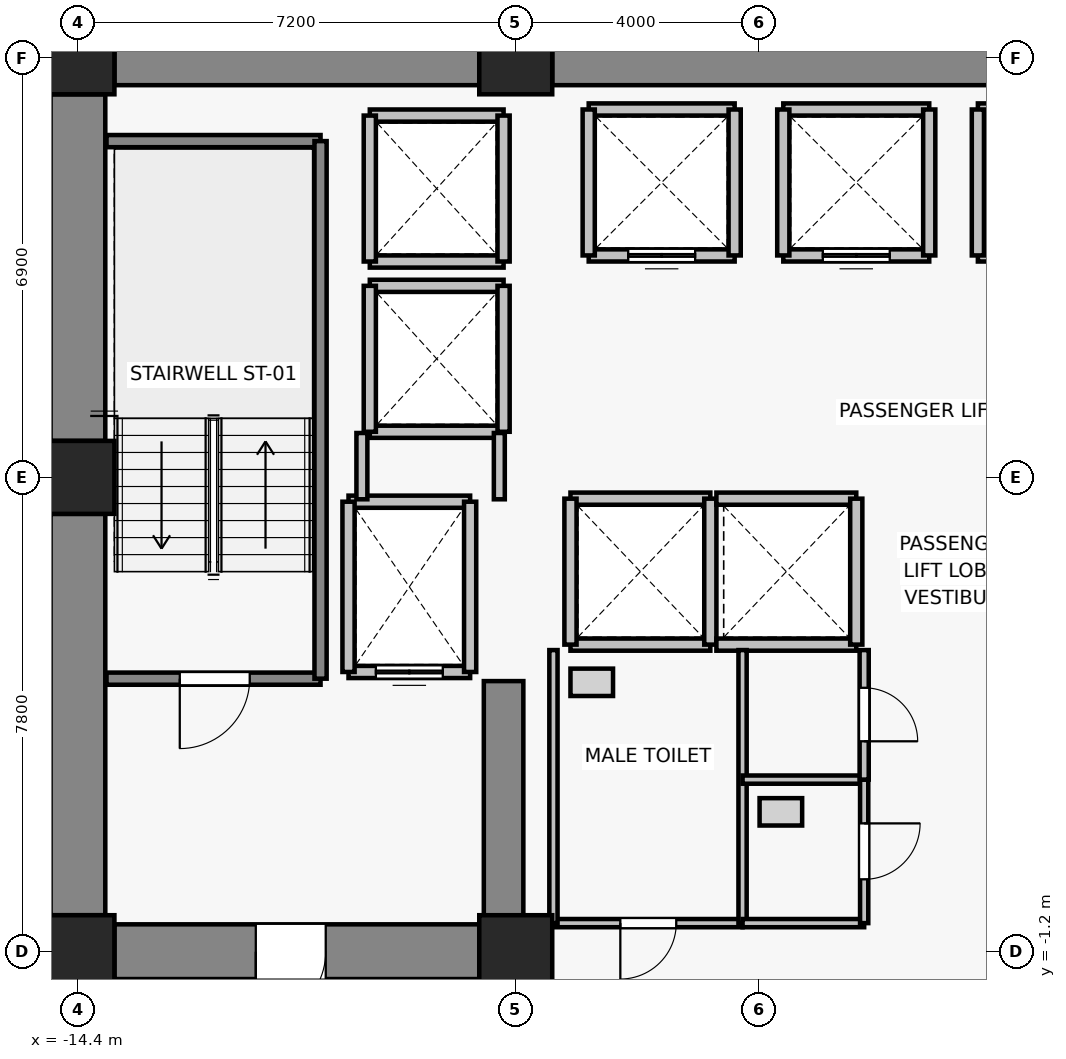
"""IFC4 building model, lengths in metres.
Left out: names, types, materials, properties, quantities, classifications, styles, units other than length and angle.
Written with IfcOpenShell. Run it as: python <this file> out.ifc"""

import sys

from ifc_helpers import new_model, si_unit, direction, frame, frame_2d, origin, origin_2d, place, context, subcontext, project, spatial, rectangle, extrude, source, transform, mapped, element, fill, save


model = new_model("IFC4")
c1 = context("Model", 3, precision=1e-05, world=origin(), true_north=direction((0.0, 1.0)))
c2 = subcontext(c1, "Body", "Model", "MODEL_VIEW")
j1 = project(units=[si_unit("LENGTHUNIT", "METRE"), si_unit("PLANEANGLEUNIT", "RADIAN")], contexts=[c1])
p1 = place(None, origin())
s1 = spatial("IfcSite", under=j1, at=p1, CompositionType="ELEMENT")
p2 = place(p1, origin())
s2 = spatial("IfcBuilding", under=s1, at=p2, CompositionType="ELEMENT")
p3 = place(p2, frame((0.0, 0.0, 30.7)))
s3 = spatial("IfcBuildingStorey", under=s2, at=p3, CompositionType="ELEMENT", Elevation=30.7)
for number, where, z_axis, x_axis in (
    (1, (-14.4, -1.2, 0.0), (0.0, 0.0, 1.0), (1.0, 0.0, 0.0)),
    (2, (-7.2, -1.2, 0.0), (0.0, 0.0, 1.0), (1.0, 0.0, 0.0)),
    (3, (-14.4, 6.6, 0.0), (0.0, 0.0, 1.0), (1.0, 0.0, 0.0)),
    (4, (-14.4, 13.5, 0.0), (0.0, 0.0, 1.0), (1.0, 0.0, 0.0)),
    (5, (-7.2, 13.5, 0.0), (0.0, 0.0, 1.0), (1.0, 0.0, 0.0)),
):
    element("IfcColumn", number, at=place(p3, frame(where, z_axis=z_axis, x_axis=x_axis)), inside=s3, PredefinedType="COLUMN", context=c2, shape_type="SweptSolid", body=[
        extrude(rectangle(XDim=1.2, YDim=1.2, at=origin_2d()), origin(), (0.0, 0.0, 1.0), 3.3),
    ])
p4 = place(p3, frame((-13.8, 13.5, 0.0), z_axis=(0.0, 0.0, 1.0), x_axis=(1.0, 0.0, 0.0)))
e6 = element("IfcWall", 6, at=p4, inside=s3, PredefinedType="SHEAR", context=c2, shape_type="SweptSolid", body=[
    extrude(rectangle(XDim=6.0, YDim=0.9, at=frame_2d((3.0, 0.0))), origin(), (0.0, 0.0, 1.0), 3.075),
])
p5 = place(p3, frame((-6.6, 13.5, 0.0), z_axis=(0.0, 0.0, 1.0), x_axis=(1.0, 0.0, 0.0)))
e7 = element("IfcWall", 7, at=p5, inside=s3, PredefinedType="SHEAR", context=c2, shape_type="SweptSolid", body=[
    extrude(rectangle(XDim=13.2, YDim=0.9, at=frame_2d((6.6, 0.0))), origin(), (0.0, 0.0, 1.0), 3.075),
])
p6 = place(p3, frame((-14.4, -0.6, 0.0), z_axis=(0.0, 0.0, 1.0), x_axis=(0.0, 1.0, 0.0)))
e8 = element("IfcWall", 8, at=p6, inside=s3, PredefinedType="SHEAR", context=c2, shape_type="SweptSolid", body=[
    extrude(rectangle(XDim=6.6, YDim=0.9, at=frame_2d((3.3, 0.0))), origin(), (0.0, 0.0, 1.0), 3.075),
])
p7 = place(p3, frame((-14.4, 7.2, 0.0), z_axis=(0.0, 0.0, 1.0), x_axis=(0.0, 1.0, 0.0)))
e9 = element("IfcWall", 9, at=p7, inside=s3, PredefinedType="SHEAR", context=c2, shape_type="SweptSolid", body=[
    extrude(rectangle(XDim=5.7, YDim=0.9, at=frame_2d((2.85, 0.0))), origin(), (0.0, 0.0, 1.0), 3.075),
])
p8 = place(p3, frame((-7.8, -1.2, 0.0), z_axis=(0.0, 0.0, 1.0), x_axis=(-1.0, 0.0, 0.0)))
e10 = element("IfcWall", 10, at=p8, inside=s3, PredefinedType="SHEAR", context=c2, shape_type="SweptSolid", body=[
    extrude(rectangle(XDim=6.0, YDim=0.9, at=frame_2d((3.0, 0.0))), origin(), (0.0, 0.0, 1.0), 3.075),
])
p9 = place(p8, frame((2.525, 0.0, 0.0)))
e11 = element("IfcOpeningElement", 11, at=p9, cuts=e10, PredefinedType="OPENING", context=c2, shape_type="SweptSolid", body=[
    extrude(rectangle(XDim=1.15, YDim=2.15, at=frame_2d((0.575, 1.075))), frame((0.0, 0.46, 0.0), z_axis=(0.0, -1.0, 0.0), x_axis=(1.0, 0.0, 0.0)), (0.0, 0.0, 1.0), 0.92),
])
p10 = place(p3, frame((-7.4, -0.75, 0.0), z_axis=(0.0, 0.0, 1.0), x_axis=(0.0, 1.0, 0.0)))
e12 = element("IfcWall", 12, at=p10, inside=s3, PredefinedType="SHEAR", context=c2, shape_type="SweptSolid", body=[
    extrude(rectangle(XDim=4.0, YDim=0.65, at=frame_2d((2.0, 0.0))), origin(), (0.0, 0.0, 1.0), 3.075),
])
p11 = place(p3, frame((-7.95, 3.4, 0.0), z_axis=(0.0, 0.0, 1.0), x_axis=(-1.0, 0.0, 0.0)))
e13 = element("IfcWall", 13, at=p11, inside=s3, PredefinedType="SOLIDWALL", context=c2, shape_type="SweptSolid", body=[
    extrude(rectangle(XDim=2.0, YDim=0.2, at=frame_2d((1.0, 0.0))), origin(), (0.0, 0.0, 1.0), 3.075),
])
p12 = place(p11, frame((0.45, 0.0, 0.0)))
e14 = element("IfcOpeningElement", 14, at=p12, cuts=e13, PredefinedType="OPENING", context=c2, shape_type="SweptSolid", body=[
    extrude(rectangle(XDim=1.1, YDim=2.2, at=frame_2d((0.55, 1.1))), frame((0.0, 0.11, 0.0), z_axis=(0.0, -1.0, 0.0), x_axis=(1.0, 0.0, 0.0)), (0.0, 0.0, 1.0), 0.22),
])
p13 = place(p3, frame((-9.95, 6.2, 0.0), z_axis=(0.0, 0.0, 1.0), x_axis=(1.0, 0.0, 0.0)))
e15 = element("IfcWall", 15, at=p13, inside=s3, PredefinedType="SOLIDWALL", context=c2, shape_type="SweptSolid", body=[
    extrude(rectangle(XDim=2.0, YDim=0.2, at=frame_2d((1.0, 0.0))), origin(), (0.0, 0.0, 1.0), 3.075),
])
for number, where, z_axis, x_axis in (
    (16, (-9.95, 3.4, 0.0), (0.0, 0.0, 1.0), (0.0, 1.0, 0.0)),
    (17, (-7.95, 6.2, 0.0), (0.0, 0.0, 1.0), (0.0, -1.0, 0.0)),
):
    element("IfcWall", number, at=place(p3, frame(where, z_axis=z_axis, x_axis=x_axis)), inside=s3, PredefinedType="SOLIDWALL", context=c2, shape_type="SweptSolid", body=[
        extrude(rectangle(XDim=2.8, YDim=0.2, at=frame_2d((1.4, 0.0))), origin(), (0.0, 0.0, 1.0), 3.075),
    ])
p14 = place(p3, frame((-3.6, 10.25, 0.0), z_axis=(0.0, 0.0, 1.0), x_axis=(-1.0, 0.0, 0.0)))
e18 = element("IfcWall", 18, at=p14, inside=s3, PredefinedType="SOLIDWALL", context=c2, shape_type="SweptSolid", body=[
    extrude(rectangle(XDim=2.4, YDim=0.2, at=frame_2d((1.2, 0.0))), origin(), (0.0, 0.0, 1.0), 3.075),
])
p15 = place(p14, frame((0.65, 0.0, 0.0)))
e19 = element("IfcOpeningElement", 19, at=p15, cuts=e18, PredefinedType="OPENING", context=c2, shape_type="SweptSolid", body=[
    extrude(rectangle(XDim=1.1, YDim=2.2, at=frame_2d((0.55, 1.1))), frame((0.0, 0.11, 0.0), z_axis=(0.0, -1.0, 0.0), x_axis=(1.0, 0.0, 0.0)), (0.0, 0.0, 1.0), 0.22),
])
for number, where, z_axis, x_axis in (
    (20, (-6.0, 12.65, 0.0), (0.0, 0.0, 1.0), (1.0, 0.0, 0.0)),
    (21, (-6.0, 10.25, 0.0), (0.0, 0.0, 1.0), (0.0, 1.0, 0.0)),
    (22, (-3.6, 12.65, 0.0), (0.0, 0.0, 1.0), (0.0, -1.0, 0.0)),
):
    element("IfcWall", number, at=place(p3, frame(where, z_axis=z_axis, x_axis=x_axis)), inside=s3, PredefinedType="SOLIDWALL", context=c2, shape_type="SweptSolid", body=[
        extrude(rectangle(XDim=2.4, YDim=0.2, at=frame_2d((1.2, 0.0))), origin(), (0.0, 0.0, 1.0), 3.075),
    ])
p16 = place(p3, frame((-0.4, 10.25, 0.0), z_axis=(0.0, 0.0, 1.0), x_axis=(-1.0, 0.0, 0.0)))
e23 = element("IfcWall", 23, at=p16, inside=s3, PredefinedType="SOLIDWALL", context=c2, shape_type="SweptSolid", body=[
    extrude(rectangle(XDim=2.4, YDim=0.2, at=frame_2d((1.2, 0.0))), origin(), (0.0, 0.0, 1.0), 3.075),
])
p17 = place(p16, frame((0.65, 0.0, 0.0)))
e24 = element("IfcOpeningElement", 24, at=p17, cuts=e23, PredefinedType="OPENING", context=c2, shape_type="SweptSolid", body=[
    extrude(rectangle(XDim=1.1, YDim=2.2, at=frame_2d((0.55, 1.1))), frame((0.0, 0.11, 0.0), z_axis=(0.0, -1.0, 0.0), x_axis=(1.0, 0.0, 0.0)), (0.0, 0.0, 1.0), 0.22),
])
p18 = place(p3, frame((-2.8, 12.65, 0.0), z_axis=(0.0, 0.0, 1.0), x_axis=(1.0, 0.0, 0.0)))
e25 = element("IfcWall", 25, at=p18, inside=s3, PredefinedType="SOLIDWALL", context=c2, shape_type="SweptSolid", body=[
    extrude(rectangle(XDim=2.4, YDim=0.2, at=frame_2d((1.2, 0.0))), origin(), (0.0, 0.0, 1.0), 3.075),
])
for number, where, z_axis, x_axis in (
    (26, (-2.8, 10.25, 0.0), (0.0, 0.0, 1.0), (0.0, 1.0, 0.0)),
    (27, (-0.4, 12.65, 0.0), (0.0, 0.0, 1.0), (0.0, -1.0, 0.0)),
):
    element("IfcWall", number, at=place(p3, frame(where, z_axis=z_axis, x_axis=x_axis)), inside=s3, PredefinedType="SOLIDWALL", context=c2, shape_type="SweptSolid", body=[
        extrude(rectangle(XDim=2.4, YDim=0.2, at=frame_2d((1.2, 0.0))), origin(), (0.0, 0.0, 1.0), 3.075),
    ])
p19 = place(p3, frame((2.8, 10.25, 0.0), z_axis=(0.0, 0.0, 1.0), x_axis=(-1.0, 0.0, 0.0)))
e28 = element("IfcWall", 28, at=p19, inside=s3, PredefinedType="SOLIDWALL", context=c2, shape_type="SweptSolid", body=[
    extrude(rectangle(XDim=2.4, YDim=0.2, at=frame_2d((1.2, 0.0))), origin(), (0.0, 0.0, 1.0), 3.075),
])
p20 = place(p19, frame((0.65, 0.0, 0.0)))
e29 = element("IfcOpeningElement", 29, at=p20, cuts=e28, PredefinedType="OPENING", context=c2, shape_type="SweptSolid", body=[
    extrude(rectangle(XDim=1.1, YDim=2.2, at=frame_2d((0.55, 1.1))), frame((0.0, 0.11, 0.0), z_axis=(0.0, -1.0, 0.0), x_axis=(1.0, 0.0, 0.0)), (0.0, 0.0, 1.0), 0.22),
])
p21 = place(p3, frame((0.4, 12.65, 0.0), z_axis=(0.0, 0.0, 1.0), x_axis=(1.0, 0.0, 0.0)))
e30 = element("IfcWall", 30, at=p21, inside=s3, PredefinedType="SOLIDWALL", context=c2, shape_type="SweptSolid", body=[
    extrude(rectangle(XDim=2.4, YDim=0.2, at=frame_2d((1.2, 0.0))), origin(), (0.0, 0.0, 1.0), 3.075),
])
p22 = place(p3, frame((0.4, 10.25, 0.0), z_axis=(0.0, 0.0, 1.0), x_axis=(0.0, 1.0, 0.0)))
e31 = element("IfcWall", 31, at=p22, inside=s3, PredefinedType="SOLIDWALL", context=c2, shape_type="SweptSolid", body=[
    extrude(rectangle(XDim=2.4, YDim=0.2, at=frame_2d((1.2, 0.0))), origin(), (0.0, 0.0, 1.0), 3.075),
])
for number, where, z_axis, x_axis in (
    (32, (-4.0, 3.85, 0.0), (0.0, 0.0, 1.0), (-1.0, 0.0, 0.0)),
    (33, (-6.3, 6.25, 0.0), (0.0, 0.0, 1.0), (1.0, 0.0, 0.0)),
):
    element("IfcWall", number, at=place(p3, frame(where, z_axis=z_axis, x_axis=x_axis)), inside=s3, PredefinedType="SOLIDWALL", context=c2, shape_type="SweptSolid", body=[
        extrude(rectangle(XDim=2.3, YDim=0.2, at=frame_2d((1.15, 0.0))), origin(), (0.0, 0.0, 1.0), 3.075),
    ])
for number, where, z_axis, x_axis in (
    (34, (-6.3, 3.85, 0.0), (0.0, 0.0, 1.0), (0.0, 1.0, 0.0)),
    (35, (-4.0, 6.25, 0.0), (0.0, 0.0, 1.0), (0.0, -1.0, 0.0)),
):
    element("IfcWall", number, at=place(p3, frame(where, z_axis=z_axis, x_axis=x_axis)), inside=s3, PredefinedType="SOLIDWALL", context=c2, shape_type="SweptSolid", body=[
        extrude(rectangle(XDim=2.4, YDim=0.2, at=frame_2d((1.2, 0.0))), origin(), (0.0, 0.0, 1.0), 3.075),
    ])
for number, where, z_axis, x_axis in (
    (36, (-1.6, 3.85, 0.0), (0.0, 0.0, 1.0), (-1.0, 0.0, 0.0)),
    (37, (-3.9, 6.25, 0.0), (0.0, 0.0, 1.0), (1.0, 0.0, 0.0)),
):
    element("IfcWall", number, at=place(p3, frame(where, z_axis=z_axis, x_axis=x_axis)), inside=s3, PredefinedType="SOLIDWALL", context=c2, shape_type="SweptSolid", body=[
        extrude(rectangle(XDim=2.3, YDim=0.2, at=frame_2d((1.15, 0.0))), origin(), (0.0, 0.0, 1.0), 3.075),
    ])
p23 = place(p3, frame((-1.6, 6.25, 0.0), z_axis=(0.0, 0.0, 1.0), x_axis=(0.0, -1.0, 0.0)))
e38 = element("IfcWall", 38, at=p23, inside=s3, PredefinedType="SOLIDWALL", context=c2, shape_type="SweptSolid", body=[
    extrude(rectangle(XDim=2.4, YDim=0.2, at=frame_2d((1.2, 0.0))), origin(), (0.0, 0.0, 1.0), 3.075),
])
for number, where, z_axis, x_axis in (
    (39, (-7.4, 7.35, 0.0), (0.0, 0.0, 1.0), (-1.0, 0.0, 0.0)),
    (40, (-9.6, 9.75, 0.0), (0.0, 0.0, 1.0), (1.0, 0.0, 0.0)),
):
    element("IfcWall", number, at=place(p3, frame(where, z_axis=z_axis, x_axis=x_axis)), inside=s3, PredefinedType="SOLIDWALL", context=c2, shape_type="SweptSolid", body=[
        extrude(rectangle(XDim=2.2, YDim=0.2, at=frame_2d((1.1, 0.0))), origin(), (0.0, 0.0, 1.0), 2.465),
    ])
p24 = place(p3, frame((-9.6, 7.35, 0.0), z_axis=(0.0, 0.0, 1.0), x_axis=(0.0, 1.0, 0.0)))
e41 = element("IfcWall", 41, at=p24, inside=s3, PredefinedType="SOLIDWALL", context=c2, shape_type="SweptSolid", body=[
    extrude(rectangle(XDim=2.4, YDim=0.2, at=frame_2d((1.2, 0.0))), origin(), (0.0, 0.0, 1.0), 3.075),
])
p25 = place(p3, frame((-7.4, 9.75, 0.0), z_axis=(0.0, 0.0, 1.0), x_axis=(0.0, -1.0, 0.0)))
e42 = element("IfcWall", 42, at=p25, inside=s3, PredefinedType="SOLIDWALL", context=c2, shape_type="SweptSolid", body=[
    extrude(rectangle(XDim=2.4, YDim=0.2, at=frame_2d((1.2, 0.0))), origin(), (0.0, 0.0, 1.0), 2.465),
])
for number, where, z_axis, x_axis in (
    (43, (-7.4, 10.15, 0.0), (0.0, 0.0, 1.0), (-1.0, 0.0, 0.0)),
    (44, (-9.6, 12.55, 0.0), (0.0, 0.0, 1.0), (1.0, 0.0, 0.0)),
):
    element("IfcWall", number, at=place(p3, frame(where, z_axis=z_axis, x_axis=x_axis)), inside=s3, PredefinedType="SOLIDWALL", context=c2, shape_type="SweptSolid", body=[
        extrude(rectangle(XDim=2.2, YDim=0.2, at=frame_2d((1.1, 0.0))), origin(), (0.0, 0.0, 1.0), 2.465),
    ])
p26 = place(p3, frame((-9.6, 10.15, 0.0), z_axis=(0.0, 0.0, 1.0), x_axis=(0.0, 1.0, 0.0)))
e45 = element("IfcWall", 45, at=p26, inside=s3, PredefinedType="SOLIDWALL", context=c2, shape_type="SweptSolid", body=[
    extrude(rectangle(XDim=2.4, YDim=0.2, at=frame_2d((1.2, 0.0))), origin(), (0.0, 0.0, 1.0), 3.075),
])
p27 = place(p3, frame((-7.4, 12.55, 0.0), z_axis=(0.0, 0.0, 1.0), x_axis=(0.0, -1.0, 0.0)))
e46 = element("IfcWall", 46, at=p27, inside=s3, PredefinedType="SOLIDWALL", context=c2, shape_type="SweptSolid", body=[
    extrude(rectangle(XDim=2.4, YDim=0.2, at=frame_2d((1.2, 0.0))), origin(), (0.0, 0.0, 1.0), 2.465),
])
p28 = place(p3, frame((-10.41, 3.29, 0.0), z_axis=(0.0, 0.0, 1.0), x_axis=(-1.0, 0.0, 0.0)))
e47 = element("IfcWall", 47, at=p28, inside=s3, PredefinedType="SOLIDWALL", context=c2, shape_type="SweptSolid", body=[
    extrude(rectangle(XDim=3.52, YDim=0.2, at=frame_2d((1.76, 0.0))), origin(), (0.0, 0.0, 1.0), 3.075),
])
p29 = place(p28, frame((1.165, 0.0, 0.0)))
e48 = element("IfcOpeningElement", 48, at=p29, cuts=e47, PredefinedType="OPENING", context=c2, shape_type="SweptSolid", body=[
    extrude(rectangle(XDim=1.15, YDim=2.15, at=frame_2d((0.575, 1.075))), frame((0.0, 0.11, 0.0), z_axis=(0.0, -1.0, 0.0), x_axis=(1.0, 0.0, 0.0)), (0.0, 0.0, 1.0), 0.22),
])
p30 = place(p3, frame((-13.93, 12.13, 0.0), z_axis=(0.0, 0.0, 1.0), x_axis=(1.0, 0.0, 0.0)))
e49 = element("IfcWall", 49, at=p30, inside=s3, PredefinedType="SOLIDWALL", context=c2, shape_type="SweptSolid", body=[
    extrude(rectangle(XDim=3.52, YDim=0.2, at=frame_2d((1.76, 0.0))), origin(), (0.0, 0.0, 1.0), 3.075),
])
p31 = place(p3, frame((-10.41, 12.13, 0.0), z_axis=(0.0, 0.0, 1.0), x_axis=(0.0, -1.0, 0.0)))
e50 = element("IfcWall", 50, at=p31, inside=s3, PredefinedType="SOLIDWALL", context=c2, shape_type="SweptSolid", body=[
    extrude(rectangle(XDim=8.84, YDim=0.2, at=frame_2d((4.42, 0.0))), origin(), (0.0, 0.0, 1.0), 3.075),
])
p32 = place(p3, frame((-9.73, 6.24, 0.0), z_axis=(0.0, 0.0, 1.0), x_axis=(0.0, 1.0, 0.0)))
e51 = element("IfcWall", 51, at=p32, inside=s3, PredefinedType="PARTITIONING", context=c2, shape_type="SweptSolid", body=[
    extrude(rectangle(XDim=1.09, YDim=0.18, at=frame_2d((0.545, 0.0))), origin(), (0.0, 0.0, 1.0), 3.075),
])
p33 = place(p3, frame((-7.47, 7.33, 0.0), z_axis=(0.0, 0.0, 1.0), x_axis=(0.0, -1.0, 0.0)))
e52 = element("IfcWall", 52, at=p33, inside=s3, PredefinedType="PARTITIONING", context=c2, shape_type="SweptSolid", body=[
    extrude(rectangle(XDim=1.09, YDim=0.18, at=frame_2d((0.545, 0.0))), origin(), (0.0, 0.0, 1.0), 2.465),
])
p34 = place(p3, frame((-3.47, -0.73, 0.0), z_axis=(0.0, 0.0, 1.0), x_axis=(-1.0, 0.0, 0.0)))
e53 = element("IfcWall", 53, at=p34, inside=s3, PredefinedType="PARTITIONING", context=c2, shape_type="SweptSolid", body=[
    extrude(rectangle(XDim=3.11, YDim=0.135, at=frame_2d((1.555, 0.0))), origin(), (0.0, 0.0, 1.0), 3.075),
])
p35 = place(p34, frame((1.09, 0.0, 0.0)))
e54 = element("IfcOpeningElement", 54, at=p35, cuts=e53, PredefinedType="OPENING", context=c2, shape_type="SweptSolid", body=[
    extrude(rectangle(XDim=0.92, YDim=2.1, at=frame_2d((0.46, 1.05))), frame((0.0, 0.077, 0.0), z_axis=(0.0, -1.0, 0.0), x_axis=(1.0, 0.0, 0.0)), (0.0, 0.0, 1.0), 0.155),
])
for number, where, z_axis, x_axis in (
    (55, (-6.58, -0.73, 0.0), (0.0, 0.0, 1.0), (0.0, 1.0, 0.0)),
    (56, (-3.47, 3.76, 0.0), (0.0, 0.0, 1.0), (0.0, -1.0, 0.0)),
):
    element("IfcWall", number, at=place(p3, frame(where, z_axis=z_axis, x_axis=x_axis)), inside=s3, PredefinedType="PARTITIONING", context=c2, shape_type="SweptSolid", body=[
        extrude(rectangle(XDim=4.49, YDim=0.135, at=frame_2d((2.245, 0.0))), origin(), (0.0, 0.0, 1.0), 3.075),
    ])
for number, where, z_axis, x_axis in (
    (57, (-1.47, -0.73, 0.0), (0.0, 0.0, 1.0), (-1.0, 0.0, 0.0)),
    (58, (-3.47, 1.63, 0.0), (0.0, 0.0, 1.0), (1.0, 0.0, 0.0)),
):
    element("IfcWall", number, at=place(p3, frame(where, z_axis=z_axis, x_axis=x_axis)), inside=s3, PredefinedType="PARTITIONING", context=c2, shape_type="SweptSolid", body=[
        extrude(rectangle(XDim=2.0, YDim=0.135, at=frame_2d((1.0, 0.0))), origin(), (0.0, 0.0, 1.0), 3.075),
    ])
p36 = place(p3, frame((-1.47, 1.63, 0.0), z_axis=(0.0, 0.0, 1.0), x_axis=(0.0, -1.0, 0.0)))
e59 = element("IfcWall", 59, at=p36, inside=s3, PredefinedType="PARTITIONING", context=c2, shape_type="SweptSolid", body=[
    extrude(rectangle(XDim=2.36, YDim=0.135, at=frame_2d((1.18, 0.0))), origin(), (0.0, 0.0, 1.0), 3.075),
])
p37 = place(p36, frame((0.72, 0.0, 0.0)))
e60 = element("IfcOpeningElement", 60, at=p37, cuts=e59, PredefinedType="OPENING", context=c2, shape_type="SweptSolid", body=[
    extrude(rectangle(XDim=0.92, YDim=2.1, at=frame_2d((0.46, 1.05))), frame((0.0, 0.077, 0.0), z_axis=(0.0, -1.0, 0.0), x_axis=(1.0, 0.0, 0.0)), (0.0, 0.0, 1.0), 0.155),
])
p38 = place(p3, frame((-1.47, 3.76, 0.0), z_axis=(0.0, 0.0, 1.0), x_axis=(0.0, -1.0, 0.0)))
e61 = element("IfcWall", 61, at=p38, inside=s3, PredefinedType="PARTITIONING", context=c2, shape_type="SweptSolid", body=[
    extrude(rectangle(XDim=2.13, YDim=0.15, at=frame_2d((1.065, 0.0))), origin(), (0.0, 0.0, 1.0), 3.075),
])
p39 = place(p38, frame((0.62, 0.0, 0.0)))
e62 = element("IfcOpeningElement", 62, at=p39, cuts=e61, PredefinedType="OPENING", context=c2, shape_type="SweptSolid", body=[
    extrude(rectangle(XDim=0.88, YDim=2.1, at=frame_2d((0.44, 1.05))), frame((0.0, 0.085, 0.0), z_axis=(0.0, -1.0, 0.0), x_axis=(1.0, 0.0, 0.0)), (0.0, 0.0, 1.0), 0.17),
])
m1 = source(origin(), c2, "Body", "SweptSolid", [
    extrude(rectangle(XDim=1.1, YDim=2.2, at=frame_2d((0.55, 1.1))), frame((0.0, 0.025, 0.0), z_axis=(0.0, -1.0, 0.0), x_axis=(1.0, 0.0, 0.0)), (0.0, 0.0, 1.0), 0.05),
])
p40 = place(p12, origin())
e63 = element("IfcDoor", 63, at=p40, inside=s3, OperationType="DOUBLE_DOOR_SLIDING", PredefinedType="DOOR", context=c2, shape_type="MappedRepresentation", body=[
    mapped(m1, transform((0.0, 0.0, 0.0), x_axis=(1.0, 0.0, 0.0), y_axis=(0.0, 1.0, 0.0), z_axis=(0.0, 0.0, 1.0), scale=1.0)),
])
fill(e14, e63)
p41 = place(p15, origin())
e64 = element("IfcDoor", 64, at=p41, inside=s3, OperationType="DOUBLE_DOOR_SLIDING", PredefinedType="DOOR", context=c2, shape_type="MappedRepresentation", body=[
    mapped(m1, transform((0.0, 0.0, 0.0), x_axis=(1.0, 0.0, 0.0), y_axis=(0.0, 1.0, 0.0), z_axis=(0.0, 0.0, 1.0), scale=1.0)),
])
fill(e19, e64)
p42 = place(p17, origin())
e65 = element("IfcDoor", 65, at=p42, inside=s3, OperationType="DOUBLE_DOOR_SLIDING", PredefinedType="DOOR", context=c2, shape_type="MappedRepresentation", body=[
    mapped(m1, transform((0.0, 0.0, 0.0), x_axis=(1.0, 0.0, 0.0), y_axis=(0.0, 1.0, 0.0), z_axis=(0.0, 0.0, 1.0), scale=1.0)),
])
fill(e24, e65)
m2 = source(origin(), c2, "Body", "SweptSolid", [
    extrude(rectangle(XDim=1.15, YDim=2.15, at=frame_2d((0.575, 1.075))), frame((0.0, 0.025, 0.0), z_axis=(0.0, -1.0, 0.0), x_axis=(1.0, 0.0, 0.0)), (0.0, 0.0, 1.0), 0.05),
])
p43 = place(p29, origin())
e66 = element("IfcDoor", 66, at=p43, inside=s3, OperationType="SINGLE_SWING_RIGHT", PredefinedType="DOOR", context=c2, shape_type="MappedRepresentation", body=[
    mapped(m2, transform((0.0, 0.0, 0.0), x_axis=(1.0, 0.0, 0.0), y_axis=(0.0, 1.0, 0.0), z_axis=(0.0, 0.0, 1.0), scale=1.0)),
])
fill(e48, e66)
p44 = place(p9, origin())
e67 = element("IfcDoor", 67, at=p44, inside=s3, OperationType="SINGLE_SWING_RIGHT", PredefinedType="DOOR", context=c2, shape_type="MappedRepresentation", body=[
    mapped(m2, transform((0.0, 0.0, 0.0), x_axis=(1.0, 0.0, 0.0), y_axis=(0.0, 1.0, 0.0), z_axis=(0.0, 0.0, 1.0), scale=1.0)),
])
fill(e11, e67)
m3 = source(origin(), c2, "Body", "SweptSolid", [
    extrude(rectangle(XDim=0.92, YDim=2.1, at=frame_2d((0.46, 1.05))), frame((0.0, 0.025, 0.0), z_axis=(0.0, -1.0, 0.0), x_axis=(1.0, 0.0, 0.0)), (0.0, 0.0, 1.0), 0.05),
])
p45 = place(p35, origin())
e68 = element("IfcDoor", 68, at=p45, inside=s3, OperationType="SINGLE_SWING_RIGHT", PredefinedType="DOOR", context=c2, shape_type="MappedRepresentation", body=[
    mapped(m3, transform((0.0, 0.0, 0.0), x_axis=(1.0, 0.0, 0.0), y_axis=(0.0, 1.0, 0.0), z_axis=(0.0, 0.0, 1.0), scale=1.0)),
])
fill(e54, e68)
p46 = place(p37, origin())
e69 = element("IfcDoor", 69, at=p46, inside=s3, OperationType="SINGLE_SWING_LEFT", PredefinedType="DOOR", context=c2, shape_type="MappedRepresentation", body=[
    mapped(m3, transform((0.0, 0.0, 0.0), x_axis=(1.0, 0.0, 0.0), y_axis=(0.0, 1.0, 0.0), z_axis=(0.0, 0.0, 1.0), scale=1.0)),
])
fill(e60, e69)
m4 = source(origin(), c2, "Body", "SweptSolid", [
    extrude(rectangle(XDim=0.88, YDim=2.1, at=frame_2d((0.44, 1.05))), frame((0.0, 0.025, 0.0), z_axis=(0.0, -1.0, 0.0), x_axis=(1.0, 0.0, 0.0)), (0.0, 0.0, 1.0), 0.05),
])
p47 = place(p39, origin())
e70 = element("IfcDoor", 70, at=p47, inside=s3, OperationType="SINGLE_SWING_RIGHT", PredefinedType="DOOR", context=c2, shape_type="MappedRepresentation", body=[
    mapped(m4, transform((0.0, 0.0, 0.0), x_axis=(1.0, 0.0, 0.0), y_axis=(0.0, 1.0, 0.0), z_axis=(0.0, 0.0, 1.0), scale=1.0)),
])
fill(e62, e70)
save(model, sys.argv[1])
